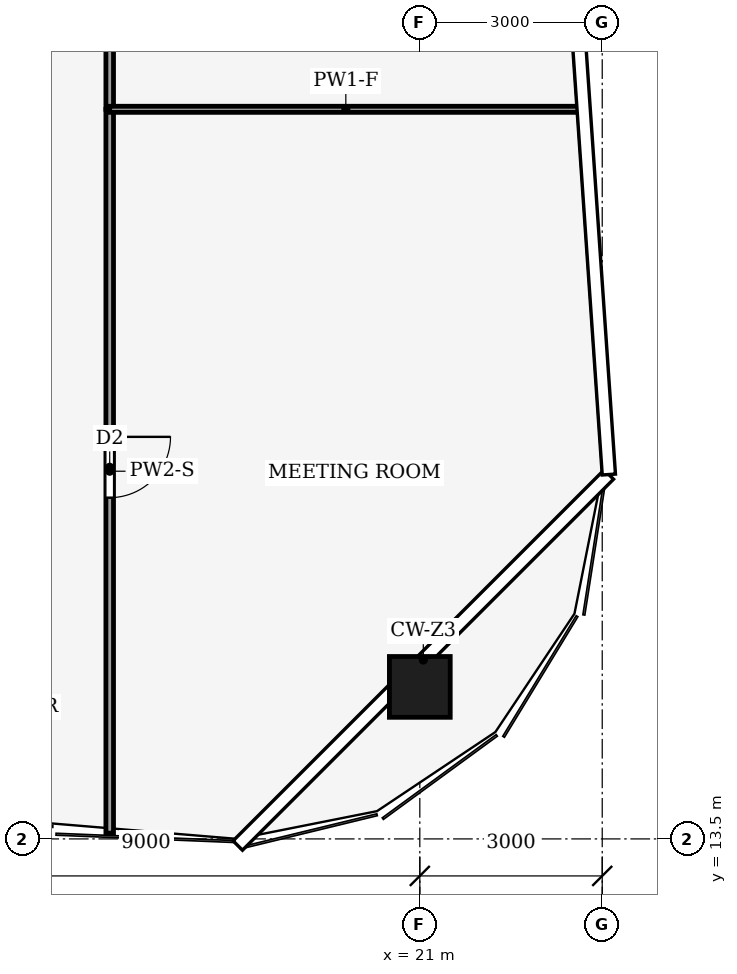
"""IFC4 building model, lengths in metres.
Left out: names, types, materials, properties, quantities, classifications, styles, units other than length and angle.
Written with IfcOpenShell. Run it as: python <this file> out.ifc"""

import sys

from ifc_helpers import new_model, si_unit, direction, frame, frame_2d, origin, origin_2d, place, context, subcontext, project, spatial, rectangle, hollow_rectangle, extrude, element, fill, save


model = new_model("IFC4")
c1 = context("Model", 3, precision=1e-05, world=origin(), true_north=direction((0.0, 1.0)))
c2 = subcontext(c1, "Body", "Model", "MODEL_VIEW")
j1 = project(units=[si_unit("LENGTHUNIT", "METRE"), si_unit("PLANEANGLEUNIT", "RADIAN")], contexts=[c1])
p1 = place(None, origin())
s1 = spatial("IfcSite", under=j1, at=p1, CompositionType="ELEMENT")
p2 = place(p1, origin())
s2 = spatial("IfcBuilding", under=s1, at=p2, CompositionType="ELEMENT")
p3 = place(p2, frame((0.0, 0.0, 186.0)))
s3 = spatial("IfcBuildingStorey", under=s2, at=p3, CompositionType="ELEMENT", Elevation=186.0)
p4 = place(p3, frame((21.0, 16.0, 0.0), z_axis=(0.0, 0.0, 1.0), x_axis=(1.0, 0.0, 0.0)))
e1 = element("IfcColumn", 1, at=p4, inside=s3, PredefinedType="COLUMN", context=c2, shape_type="SweptSolid", body=[
    extrude(hollow_rectangle(XDim=1.0, YDim=1.0, WallThickness=0.06, at=origin_2d()), origin(), (0.0, 0.0, 1.0), 4.0),
])
p5 = place(p3, frame((15.9, 25.5, 0.0), z_axis=(0.0, 0.0, 1.0), x_axis=(0.0, -1.0, 0.0)))
e2 = element("IfcWall", 2, at=p5, inside=s3, PredefinedType="PARTITIONING", context=c2, shape_type="SweptSolid", body=[
    extrude(rectangle(XDim=11.905, YDim=0.125, at=frame_2d((5.953, 0.0))), origin(), (0.0, 0.0, 1.0), 3.04),
])
p6 = place(p5, frame((5.387, 0.0, 0.0)))
e3 = element("IfcOpeningElement", 3, at=p6, cuts=e2, PredefinedType="OPENING", context=c2, shape_type="SweptSolid", body=[
    extrude(rectangle(XDim=1.0, YDim=2.1, at=frame_2d((0.5, 1.05))), frame((0.0, 0.073, 0.0), z_axis=(0.0, -1.0, 0.0), x_axis=(1.0, 0.0, 0.0)), (0.0, 0.0, 1.0), 0.145),
])
p7 = place(p3, frame((15.9, 34.5, 0.0), z_axis=(0.0, 0.0, 1.0), x_axis=(0.0, -1.0, 0.0)))
e4 = element("IfcWall", 4, at=p7, inside=s3, PredefinedType="PARTITIONING", context=c2, shape_type="SweptSolid", body=[
    extrude(rectangle(XDim=9.0, YDim=0.125, at=frame_2d((4.5, 0.0))), origin(), (0.0, 0.0, 1.0), 3.48),
])
p8 = place(p7, frame((4.0, 0.0, 0.0)))
e5 = element("IfcOpeningElement", 5, at=p8, cuts=e4, PredefinedType="OPENING", context=c2, shape_type="SweptSolid", body=[
    extrude(rectangle(XDim=1.0, YDim=2.1, at=frame_2d((0.5, 1.05))), frame((0.0, 0.073, 0.0), z_axis=(0.0, -1.0, 0.0), x_axis=(1.0, 0.0, 0.0)), (0.0, 0.0, 1.0), 0.145),
])
p9 = place(p3, frame((23.666, 25.5, 0.0), z_axis=(0.0, 0.0, 1.0), x_axis=(-1.0, 0.0, 0.0)))
e6 = element("IfcWall", 6, at=p9, inside=s3, PredefinedType="PARTITIONING", context=c2, shape_type="SweptSolid", body=[
    extrude(rectangle(XDim=7.766, YDim=0.1, at=frame_2d((3.883, 0.0))), origin(), (0.0, 0.0, 1.0), 3.04),
])
p10 = place(p6, origin())
e7 = element("IfcDoor", 7, at=p10, inside=s3, OperationType="SINGLE_SWING_LEFT", PredefinedType="DOOR", context=c2, shape_type="SweptSolid", body=[
    extrude(rectangle(XDim=1.0, YDim=2.1, at=frame_2d((0.5, 1.05))), frame((0.0, 0.025, 0.0), z_axis=(0.0, -1.0, 0.0), x_axis=(1.0, 0.0, 0.0)), (0.0, 0.0, 1.0), 0.05),
])
fill(e3, e7)
save(model, sys.argv[1])
